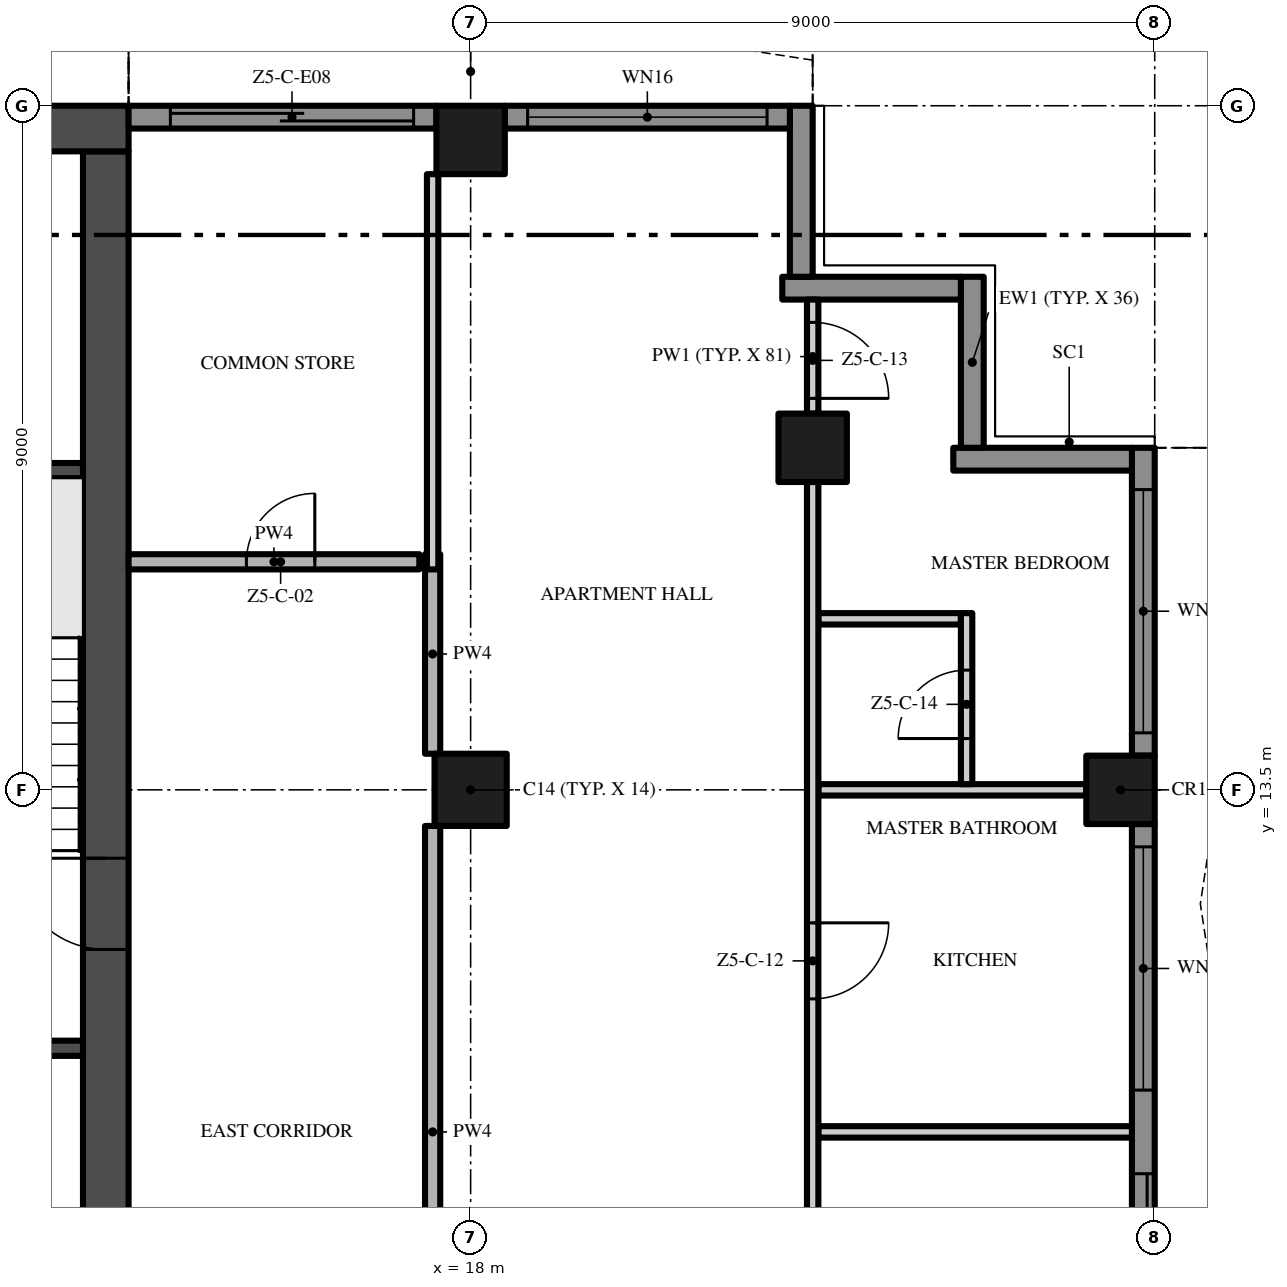
"""IFC4 building model, lengths in metres.
Left out: names, types, materials, properties, quantities, classifications, styles, units other than length and angle.
Written with IfcOpenShell. Run it as: python <this file> out.ifc"""

import sys

from ifc_helpers import new_model, si_unit, direction, frame, frame_2d, origin, origin_2d, place, context, subcontext, project, spatial, polyline, rectangle, outline, extrude, element, fill, save


model = new_model("IFC4")
c1 = context("Model", 3, precision=1e-05, world=origin(), true_north=direction((0.0, 1.0)))
c2 = subcontext(c1, "Body", "Model", "MODEL_VIEW")
j1 = project(units=[si_unit("LENGTHUNIT", "METRE"), si_unit("PLANEANGLEUNIT", "RADIAN")], contexts=[c1])
p1 = place(None, origin())
s1 = spatial("IfcSite", under=j1, at=p1, CompositionType="ELEMENT")
p2 = place(p1, origin())
s2 = spatial("IfcBuilding", under=s1, at=p2, CompositionType="ELEMENT")
p3 = place(p2, frame((0.0, 0.0, 265.4)))
s3 = spatial("IfcBuildingStorey", under=s2, at=p3, CompositionType="ELEMENT", Elevation=265.4)
p4 = place(p3, frame((13.2, 5.1, -0.3), z_axis=(0.0, 0.0, 1.0), x_axis=(0.0, 1.0, 0.0)))
e1 = element("IfcWall", 1, at=p4, inside=s3, PredefinedType="SHEAR", context=c2, shape_type="SweptSolid", body=[
    extrude(rectangle(XDim=16.8, YDim=0.6, at=frame_2d((8.4, 0.0))), origin(), (0.0, 0.0, 1.0), 3.8),
])
p5 = place(p4, frame((6.3, 0.0, 0.3)))
e2 = element("IfcOpeningElement", 2, at=p5, cuts=e1, PredefinedType="OPENING", context=c2, shape_type="SweptSolid", body=[
    extrude(rectangle(XDim=1.2, YDim=2.2, at=frame_2d((0.6, 1.1))), frame((0.0, 0.31, 0.0), z_axis=(0.0, -1.0, 0.0), x_axis=(1.0, 0.0, 0.0)), (0.0, 0.0, 1.0), 0.62),
])
p6 = place(p3, frame((13.5, 22.2, -0.3), z_axis=(0.0, 0.0, 1.0), x_axis=(-1.0, 0.0, 0.0)))
e3 = element("IfcWall", 3, at=p6, inside=s3, PredefinedType="SHEAR", context=c2, shape_type="SweptSolid", body=[
    extrude(rectangle(XDim=27.0, YDim=0.6, at=frame_2d((13.5, 0.0))), origin(), (0.0, 0.0, 1.0), 3.8),
])
p7 = place(p3, frame((18.0, 13.5, 0.0), z_axis=(0.0, 0.0, 1.0), x_axis=(1.0, 0.0, 0.0)))
e4 = element("IfcColumn", 4, at=p7, inside=s3, PredefinedType="COLUMN", context=c2, shape_type="SweptSolid", body=[
    extrude(rectangle(XDim=0.95, YDim=0.95, at=origin_2d()), origin(), (0.0, 0.0, 1.0), 3.5),
])
for number, where, z_axis, x_axis in (
    (5, (18.0, 22.05, 0.0), (0.0, 0.0, 1.0), (1.0, 0.0, 0.0)),
    (6, (26.55, 13.5, 0.0), (0.0, 0.0, 1.0), (1.0, 0.0, 0.0)),
    (7, (22.5, 18.0, 0.0), (0.0, 0.0, 1.0), (1.0, 0.0, 0.0)),
):
    element("IfcColumn", number, at=place(p3, frame(where, z_axis=z_axis, x_axis=x_axis)), inside=s3, PredefinedType="COLUMN", context=c2, shape_type="SweptSolid", body=[
        extrude(rectangle(XDim=0.9, YDim=0.9, at=origin_2d()), origin(), (0.0, 0.0, 1.0), 3.5),
    ])
p8 = place(p3, frame((26.85, 13.05, 0.0), z_axis=(0.0, 0.0, 1.0), x_axis=(0.0, -1.0, 0.0)))
e8 = element("IfcWall", 8, at=p8, inside=s3, PredefinedType="SOLIDWALL", context=c2, shape_type="SweptSolid", body=[
    extrude(rectangle(XDim=8.1, YDim=0.3, at=frame_2d((4.05, 0.0))), origin(), (0.0, 0.0, 1.0), 3.5),
])
p9 = place(p8, frame((4.6, 0.0, 0.0)))
e9 = element("IfcOpeningElement", 9, at=p9, cuts=e8, PredefinedType="OPENING", context=c2, shape_type="SweptSolid", body=[
    extrude(rectangle(XDim=3.2, YDim=2.4, at=frame_2d((1.6, 1.2))), frame((0.0, 0.16, 0.0), z_axis=(0.0, -1.0, 0.0), x_axis=(1.0, 0.0, 0.0)), (0.0, 0.0, 1.0), 0.32),
])
p10 = place(p8, frame((0.3, 0.0, 0.45)))
e10 = element("IfcOpeningElement", 10, at=p10, cuts=e8, PredefinedType="OPENING", context=c2, shape_type="SweptSolid", body=[
    extrude(rectangle(XDim=3.2, YDim=2.65, at=frame_2d((1.6, 1.325))), frame((0.0, 0.16, 0.0), z_axis=(0.0, -1.0, 0.0), x_axis=(1.0, 0.0, 0.0)), (0.0, 0.0, 1.0), 0.32),
])
p11 = place(p3, frame((26.85, 18.0, 0.0), z_axis=(0.0, 0.0, 1.0), x_axis=(0.0, -1.0, 0.0)))
e11 = element("IfcWall", 11, at=p11, inside=s3, PredefinedType="SOLIDWALL", context=c2, shape_type="SweptSolid", body=[
    extrude(rectangle(XDim=4.05, YDim=0.3, at=frame_2d((2.025, 0.0))), origin(), (0.0, 0.0, 1.0), 3.5),
])
p12 = place(p11, frame((0.55, 0.0, 0.45)))
e12 = element("IfcOpeningElement", 12, at=p12, cuts=e11, PredefinedType="OPENING", context=c2, shape_type="SweptSolid", body=[
    extrude(rectangle(XDim=3.2, YDim=2.65, at=frame_2d((1.6, 1.325))), frame((0.0, 0.16, 0.0), z_axis=(0.0, -1.0, 0.0), x_axis=(1.0, 0.0, 0.0)), (0.0, 0.0, 1.0), 0.32),
])
p13 = place(p3, frame((24.35, 17.85, 0.0), z_axis=(0.0, 0.0, 1.0), x_axis=(1.0, 0.0, 0.0)))
e13 = element("IfcWall", 13, at=p13, inside=s3, PredefinedType="SOLIDWALL", context=c2, shape_type="SweptSolid", body=[
    extrude(rectangle(XDim=2.35, YDim=0.3, at=frame_2d((1.175, 0.0))), origin(), (0.0, 0.0, 1.0), 3.5),
])
p14 = place(p3, frame((24.6, 20.25, 0.0), z_axis=(0.0, 0.0, 1.0), x_axis=(0.0, -1.0, 0.0)))
e14 = element("IfcWall", 14, at=p14, inside=s3, PredefinedType="SOLIDWALL", context=c2, shape_type="SweptSolid", body=[
    extrude(rectangle(XDim=2.25, YDim=0.3, at=frame_2d((1.125, 0.0))), origin(), (0.0, 0.0, 1.0), 3.5),
])
p15 = place(p3, frame((22.1, 20.1, 0.0), z_axis=(0.0, 0.0, 1.0), x_axis=(1.0, 0.0, 0.0)))
e15 = element("IfcWall", 15, at=p15, inside=s3, PredefinedType="SOLIDWALL", context=c2, shape_type="SweptSolid", body=[
    extrude(rectangle(XDim=2.35, YDim=0.3, at=frame_2d((1.175, 0.0))), origin(), (0.0, 0.0, 1.0), 3.5),
])
p16 = place(p3, frame((22.35, 22.5, 0.0), z_axis=(0.0, 0.0, 1.0), x_axis=(0.0, -1.0, 0.0)))
e16 = element("IfcWall", 16, at=p16, inside=s3, PredefinedType="SOLIDWALL", context=c2, shape_type="SweptSolid", body=[
    extrude(rectangle(XDim=2.25, YDim=0.3, at=frame_2d((1.125, 0.0))), origin(), (0.0, 0.0, 1.0), 3.5),
])
p17 = place(p3, frame((18.45, 22.35, 0.0), z_axis=(0.0, 0.0, 1.0), x_axis=(1.0, 0.0, 0.0)))
e17 = element("IfcWall", 17, at=p17, inside=s3, PredefinedType="SOLIDWALL", context=c2, shape_type="SweptSolid", body=[
    extrude(rectangle(XDim=3.75, YDim=0.3, at=frame_2d((1.875, 0.0))), origin(), (0.0, 0.0, 1.0), 3.5),
])
p18 = place(p17, frame((0.3, 0.0, 0.45)))
e18 = element("IfcOpeningElement", 18, at=p18, cuts=e17, PredefinedType="OPENING", context=c2, shape_type="SweptSolid", body=[
    extrude(rectangle(XDim=3.15, YDim=2.65, at=frame_2d((1.575, 1.325))), frame((0.0, 0.16, 0.0), z_axis=(0.0, -1.0, 0.0), x_axis=(1.0, 0.0, 0.0)), (0.0, 0.0, 1.0), 0.32),
])
p19 = place(p3, frame((13.5, 22.35, 0.0), z_axis=(0.0, 0.0, 1.0), x_axis=(1.0, 0.0, 0.0)))
e19 = element("IfcWall", 19, at=p19, inside=s3, PredefinedType="SOLIDWALL", context=c2, shape_type="SweptSolid", body=[
    extrude(rectangle(XDim=4.05, YDim=0.3, at=frame_2d((2.025, 0.0))), origin(), (0.0, 0.0, 1.0), 3.5),
])
p20 = place(p19, frame((0.55, 0.0, 0.0)))
e20 = element("IfcOpeningElement", 20, at=p20, cuts=e19, PredefinedType="OPENING", context=c2, shape_type="SweptSolid", body=[
    extrude(rectangle(XDim=3.2, YDim=2.4, at=frame_2d((1.6, 1.2))), frame((0.0, 0.16, 0.0), z_axis=(0.0, -1.0, 0.0), x_axis=(1.0, 0.0, 0.0)), (0.0, 0.0, 1.0), 0.32),
])
p21 = place(p3, origin())
e21 = element("IfcWall", 21, at=p21, inside=s3, PredefinedType="USERDEFINED", context=c2, shape_type="SweptSolid", body=[
    extrude(outline(polyline([(27.6, -18.0), (27.829, -16.5), (28.429, -15.0), (29.171, -13.5), (29.771, -12.0), (30.0, -10.5), (29.771, -9.0), (29.171, -7.5), (28.429, -6.0), (27.829, -4.5), (27.6, -3.0), (27.829, -1.5), (28.429, 0.0), (29.171, 1.5), (29.771, 3.0), (30.0, 4.5), (29.771, 6.0), (29.171, 7.5), (28.429, 9.0), (27.829, 10.5), (27.6, 12.0), (27.829, 13.5), (28.429, 15.0), (29.171, 16.5), (29.771, 18.0), (29.539, 18.093), (28.942, 16.602), (28.201, 15.102), (27.586, 13.566), (27.347, 12.0), (27.586, 10.434), (28.201, 8.898), (28.942, 7.398), (29.528, 5.934), (29.747, 4.5), (29.528, 3.066), (28.942, 1.602), (28.201, 0.102), (27.586, -1.434), (27.347, -3.0), (27.586, -4.566), (28.201, -6.102), (28.942, -7.602), (29.528, -9.066), (29.747, -10.5), (29.528, -11.934), (28.942, -13.398), (28.201, -14.898), (27.586, -16.434), (27.353, -17.962), (27.6, -18.0)])), origin(), (0.0, 0.0, 1.0), 0.9),
])
p22 = place(p3, origin())
e22 = element("IfcWall", 22, at=p22, inside=s3, PredefinedType="USERDEFINED", context=c2, shape_type="SweptSolid", body=[
    extrude(outline(polyline([(22.5, 23.1), (21.0, 23.329), (19.5, 23.929), (18.0, 24.671), (16.5, 25.271), (15.0, 25.5), (13.5, 25.271), (13.538, 25.024), (15.0, 25.247), (16.434, 25.028), (17.898, 24.442), (19.398, 23.701), (20.934, 23.086), (22.462, 22.853), (22.5, 23.1)])), origin(), (0.0, 0.0, 1.0), 0.9),
])
for number, where, z_axis, x_axis in (
    (23, (9.65, 10.1, 0.0), (0.0, 0.0, 1.0), (1.0, 0.0, 0.0)),
    (24, (9.65, 17.7, 0.0), (0.0, 0.0, 1.0), (1.0, 0.0, 0.0)),
):
    element("IfcWall", number, at=place(p3, frame(where, z_axis=z_axis, x_axis=x_axis)), inside=s3, PredefinedType="SHEAR", context=c2, shape_type="SweptSolid", body=[
        extrude(rectangle(XDim=3.25, YDim=0.2, at=frame_2d((1.625, 0.0))), origin(), (0.0, 0.0, 1.0), 3.5),
    ])
p23 = place(p3, frame((22.575, 9.0, 0.0), z_axis=(0.0, 0.0, 1.0), x_axis=(1.0, 0.0, 0.0)))
e25 = element("IfcWall", 25, at=p23, inside=s3, PredefinedType="PARTITIONING", context=c2, shape_type="SweptSolid", body=[
    extrude(rectangle(XDim=4.125, YDim=0.15, at=frame_2d((2.062, 0.0))), origin(), (0.0, 0.0, 1.0), 3.5),
])
p24 = place(p3, frame((22.575, 13.5, 0.0), z_axis=(0.0, 0.0, 1.0), x_axis=(1.0, 0.0, 0.0)))
e26 = element("IfcWall", 26, at=p24, inside=s3, PredefinedType="PARTITIONING", context=c2, shape_type="SweptSolid", body=[
    extrude(rectangle(XDim=3.525, YDim=0.15, at=frame_2d((1.762, 0.0))), origin(), (0.0, 0.0, 1.0), 3.5),
])
p25 = place(p3, frame((22.575, 15.75, 0.0), z_axis=(0.0, 0.0, 1.0), x_axis=(1.0, 0.0, 0.0)))
e27 = element("IfcWall", 27, at=p25, inside=s3, PredefinedType="PARTITIONING", context=c2, shape_type="SweptSolid", body=[
    extrude(rectangle(XDim=1.875, YDim=0.15, at=frame_2d((0.938, 0.0))), origin(), (0.0, 0.0, 1.0), 3.5),
])
p26 = place(p3, frame((13.5, 16.5, 0.0), z_axis=(0.0, 0.0, 1.0), x_axis=(1.0, 0.0, 0.0)))
e28 = element("IfcWall", 28, at=p26, inside=s3, PredefinedType="PARTITIONING", context=c2, shape_type="SweptSolid", body=[
    extrude(rectangle(XDim=3.825, YDim=0.2, at=frame_2d((1.913, 0.0))), origin(), (0.0, 0.0, 1.0), 3.5),
])
p27 = place(p26, frame((1.55, 0.0, 0.0)))
e29 = element("IfcOpeningElement", 29, at=p27, cuts=e28, PredefinedType="OPENING", context=c2, shape_type="SweptSolid", body=[
    extrude(rectangle(XDim=0.9, YDim=2.1, at=frame_2d((0.45, 1.05))), frame((0.0, 0.11, 0.0), z_axis=(0.0, -1.0, 0.0), x_axis=(1.0, 0.0, 0.0)), (0.0, 0.0, 1.0), 0.22),
])
p28 = place(p3, frame((17.5, 13.025, 0.0), z_axis=(0.0, 0.0, 1.0), x_axis=(0.0, -1.0, 0.0)))
e30 = element("IfcWall", 30, at=p28, inside=s3, PredefinedType="PARTITIONING", context=c2, shape_type="SweptSolid", body=[
    extrude(rectangle(XDim=8.05, YDim=0.2, at=frame_2d((4.025, 0.0))), origin(), (0.0, 0.0, 1.0), 3.5),
])
p29 = place(p28, frame((5.65, 0.0, 0.0)))
e31 = element("IfcOpeningElement", 31, at=p29, cuts=e30, PredefinedType="OPENING", context=c2, shape_type="SweptSolid", body=[
    extrude(rectangle(XDim=1.2, YDim=2.4, at=frame_2d((0.6, 1.2))), frame((0.0, 0.11, 0.0), z_axis=(0.0, -1.0, 0.0), x_axis=(1.0, 0.0, 0.0)), (0.0, 0.0, 1.0), 0.22),
])
p30 = place(p3, frame((17.5, 13.975, 0.0), z_axis=(0.0, 0.0, 1.0), x_axis=(0.0, 1.0, 0.0)))
e32 = element("IfcWall", 32, at=p30, inside=s3, PredefinedType="PARTITIONING", context=c2, shape_type="SweptSolid", body=[
    extrude(rectangle(XDim=2.625, YDim=0.2, at=frame_2d((1.312, 0.0))), origin(), (0.0, 0.0, 1.0), 3.5),
])
p31 = place(p3, frame((17.5, 16.4, 0.0), z_axis=(0.0, 0.0, 1.0), x_axis=(0.0, 1.0, 0.0)))
e33 = element("IfcWall", 33, at=p31, inside=s3, PredefinedType="PARTITIONING", context=c2, shape_type="SweptSolid", body=[
    extrude(rectangle(XDim=5.2, YDim=0.15, at=frame_2d((2.6, 0.0))), origin(), (0.0, 0.0, 1.0), 3.5),
])
p32 = place(p3, frame((22.5, 17.55, 0.0), z_axis=(0.0, 0.0, 1.0), x_axis=(0.0, -1.0, 0.0)))
e34 = element("IfcWall", 34, at=p32, inside=s3, PredefinedType="PARTITIONING", context=c2, shape_type="SweptSolid", body=[
    extrude(rectangle(XDim=17.45, YDim=0.15, at=frame_2d((8.725, 0.0))), origin(), (0.0, 0.0, 1.0), 3.5),
])
p33 = place(p32, frame((13.25, 0.0, 0.0)))
e35 = element("IfcOpeningElement", 35, at=p33, cuts=e34, PredefinedType="OPENING", context=c2, shape_type="SweptSolid", body=[
    extrude(rectangle(XDim=1.8, YDim=2.4, at=frame_2d((0.9, 1.2))), frame((0.0, 0.085, 0.0), z_axis=(0.0, -1.0, 0.0), x_axis=(1.0, 0.0, 0.0)), (0.0, 0.0, 1.0), 0.17),
])
p34 = place(p32, frame((5.8, 0.0, 0.0)))
e36 = element("IfcOpeningElement", 36, at=p34, cuts=e34, PredefinedType="OPENING", context=c2, shape_type="SweptSolid", body=[
    extrude(rectangle(XDim=1.0, YDim=2.4, at=frame_2d((0.5, 1.2))), frame((0.0, 0.085, 0.0), z_axis=(0.0, -1.0, 0.0), x_axis=(1.0, 0.0, 0.0)), (0.0, 0.0, 1.0), 0.17),
])
p35 = place(p3, frame((22.5, 19.95, 0.0), z_axis=(0.0, 0.0, 1.0), x_axis=(0.0, -1.0, 0.0)))
e37 = element("IfcWall", 37, at=p35, inside=s3, PredefinedType="PARTITIONING", context=c2, shape_type="SweptSolid", body=[
    extrude(rectangle(XDim=1.5, YDim=0.15, at=frame_2d((0.75, 0.0))), origin(), (0.0, 0.0, 1.0), 3.5),
])
p36 = place(p35, frame((0.3, 0.0, 0.0)))
e38 = element("IfcOpeningElement", 38, at=p36, cuts=e37, PredefinedType="OPENING", context=c2, shape_type="SweptSolid", body=[
    extrude(rectangle(XDim=1.0, YDim=2.4, at=frame_2d((0.5, 1.2))), frame((0.0, 0.085, 0.0), z_axis=(0.0, -1.0, 0.0), x_axis=(1.0, 0.0, 0.0)), (0.0, 0.0, 1.0), 0.17),
])
p37 = place(p3, frame((24.525, 13.575, 0.0), z_axis=(0.0, 0.0, 1.0), x_axis=(0.0, 1.0, 0.0)))
e39 = element("IfcWall", 39, at=p37, inside=s3, PredefinedType="PARTITIONING", context=c2, shape_type="SweptSolid", body=[
    extrude(rectangle(XDim=2.25, YDim=0.15, at=frame_2d((1.125, 0.0))), origin(), (0.0, 0.0, 1.0), 3.5),
])
p38 = place(p37, frame((0.6, 0.0, 0.0)))
e40 = element("IfcOpeningElement", 40, at=p38, cuts=e39, PredefinedType="OPENING", context=c2, shape_type="SweptSolid", body=[
    extrude(rectangle(XDim=0.9, YDim=2.1, at=frame_2d((0.45, 1.05))), frame((0.0, 0.085, 0.0), z_axis=(0.0, -1.0, 0.0), x_axis=(1.0, 0.0, 0.0)), (0.0, 0.0, 1.0), 0.17),
])
p39 = place(p9, origin())
e41 = element("IfcDoor", 41, at=p39, inside=s3, OperationType="SINGLE_SWING_LEFT", PredefinedType="DOOR", context=c2, shape_type="SweptSolid", body=[
    extrude(rectangle(XDim=3.2, YDim=2.4, at=frame_2d((1.6, 1.2))), frame((0.0, 0.025, 0.0), z_axis=(0.0, -1.0, 0.0), x_axis=(1.0, 0.0, 0.0)), (0.0, 0.0, 1.0), 0.05),
])
fill(e9, e41)
p40 = place(p10, origin())
e42 = element("IfcWindow", 42, at=p40, inside=s3, PartitioningType="SINGLE_PANEL", PredefinedType="WINDOW", context=c2, shape_type="SweptSolid", body=[
    extrude(rectangle(XDim=3.2, YDim=2.65, at=frame_2d((1.6, 1.325))), frame((0.0, 0.03, 0.0), z_axis=(0.0, -1.0, 0.0), x_axis=(1.0, 0.0, 0.0)), (0.0, 0.0, 1.0), 0.06),
])
fill(e10, e42)
p41 = place(p12, origin())
e43 = element("IfcWindow", 43, at=p41, inside=s3, PartitioningType="SINGLE_PANEL", PredefinedType="WINDOW", context=c2, shape_type="SweptSolid", body=[
    extrude(rectangle(XDim=3.2, YDim=2.65, at=frame_2d((1.6, 1.325))), frame((0.0, 0.03, 0.0), z_axis=(0.0, -1.0, 0.0), x_axis=(1.0, 0.0, 0.0)), (0.0, 0.0, 1.0), 0.06),
])
fill(e12, e43)
p42 = place(p18, origin())
e44 = element("IfcWindow", 44, at=p42, inside=s3, PartitioningType="SINGLE_PANEL", PredefinedType="WINDOW", context=c2, shape_type="SweptSolid", body=[
    extrude(rectangle(XDim=3.15, YDim=2.65, at=frame_2d((1.575, 1.325))), frame((0.0, 0.03, 0.0), z_axis=(0.0, -1.0, 0.0), x_axis=(1.0, 0.0, 0.0)), (0.0, 0.0, 1.0), 0.06),
])
fill(e18, e44)
p43 = place(p20, origin())
e45 = element("IfcDoor", 45, at=p43, inside=s3, OperationType="SINGLE_SWING_LEFT", PredefinedType="DOOR", context=c2, shape_type="SweptSolid", body=[
    extrude(rectangle(XDim=3.2, YDim=2.4, at=frame_2d((1.6, 1.2))), frame((0.0, 0.025, 0.0), z_axis=(0.0, -1.0, 0.0), x_axis=(1.0, 0.0, 0.0)), (0.0, 0.0, 1.0), 0.05),
])
fill(e20, e45)
p44 = place(p5, frame((1.2, 0.0, 0.0), z_axis=(0.0, 0.0, 1.0), x_axis=(-1.0, 0.0, 0.0)))
e46 = element("IfcDoor", 46, at=p44, inside=s3, OperationType="SINGLE_SWING_LEFT", PredefinedType="DOOR", context=c2, shape_type="SweptSolid", body=[
    extrude(rectangle(XDim=1.2, YDim=2.2, at=frame_2d((0.6, 1.1))), frame((0.0, 0.025, 0.0), z_axis=(0.0, -1.0, 0.0), x_axis=(1.0, 0.0, 0.0)), (0.0, 0.0, 1.0), 0.05),
])
fill(e2, e46)
p45 = place(p27, origin())
e47 = element("IfcDoor", 47, at=p45, inside=s3, OperationType="SINGLE_SWING_RIGHT", PredefinedType="DOOR", context=c2, shape_type="SweptSolid", body=[
    extrude(rectangle(XDim=0.9, YDim=2.1, at=frame_2d((0.45, 1.05))), frame((0.0, 0.025, 0.0), z_axis=(0.0, -1.0, 0.0), x_axis=(1.0, 0.0, 0.0)), (0.0, 0.0, 1.0), 0.05),
])
fill(e29, e47)
p46 = place(p34, origin())
e48 = element("IfcDoor", 48, at=p46, inside=s3, OperationType="SINGLE_SWING_LEFT", PredefinedType="DOOR", context=c2, shape_type="SweptSolid", body=[
    extrude(rectangle(XDim=1.0, YDim=2.4, at=frame_2d((0.5, 1.2))), frame((0.0, 0.025, 0.0), z_axis=(0.0, -1.0, 0.0), x_axis=(1.0, 0.0, 0.0)), (0.0, 0.0, 1.0), 0.05),
])
fill(e36, e48)
p47 = place(p36, origin())
e49 = element("IfcDoor", 49, at=p47, inside=s3, OperationType="SINGLE_SWING_RIGHT", PredefinedType="DOOR", context=c2, shape_type="SweptSolid", body=[
    extrude(rectangle(XDim=1.0, YDim=2.4, at=frame_2d((0.5, 1.2))), frame((0.0, 0.025, 0.0), z_axis=(0.0, -1.0, 0.0), x_axis=(1.0, 0.0, 0.0)), (0.0, 0.0, 1.0), 0.05),
])
fill(e38, e49)
p48 = place(p38, origin())
e50 = element("IfcDoor", 50, at=p48, inside=s3, OperationType="SINGLE_SWING_LEFT", PredefinedType="DOOR", context=c2, shape_type="SweptSolid", body=[
    extrude(rectangle(XDim=0.9, YDim=2.1, at=frame_2d((0.45, 1.05))), frame((0.0, 0.025, 0.0), z_axis=(0.0, -1.0, 0.0), x_axis=(1.0, 0.0, 0.0)), (0.0, 0.0, 1.0), 0.05),
])
fill(e40, e50)
save(model, sys.argv[1])
